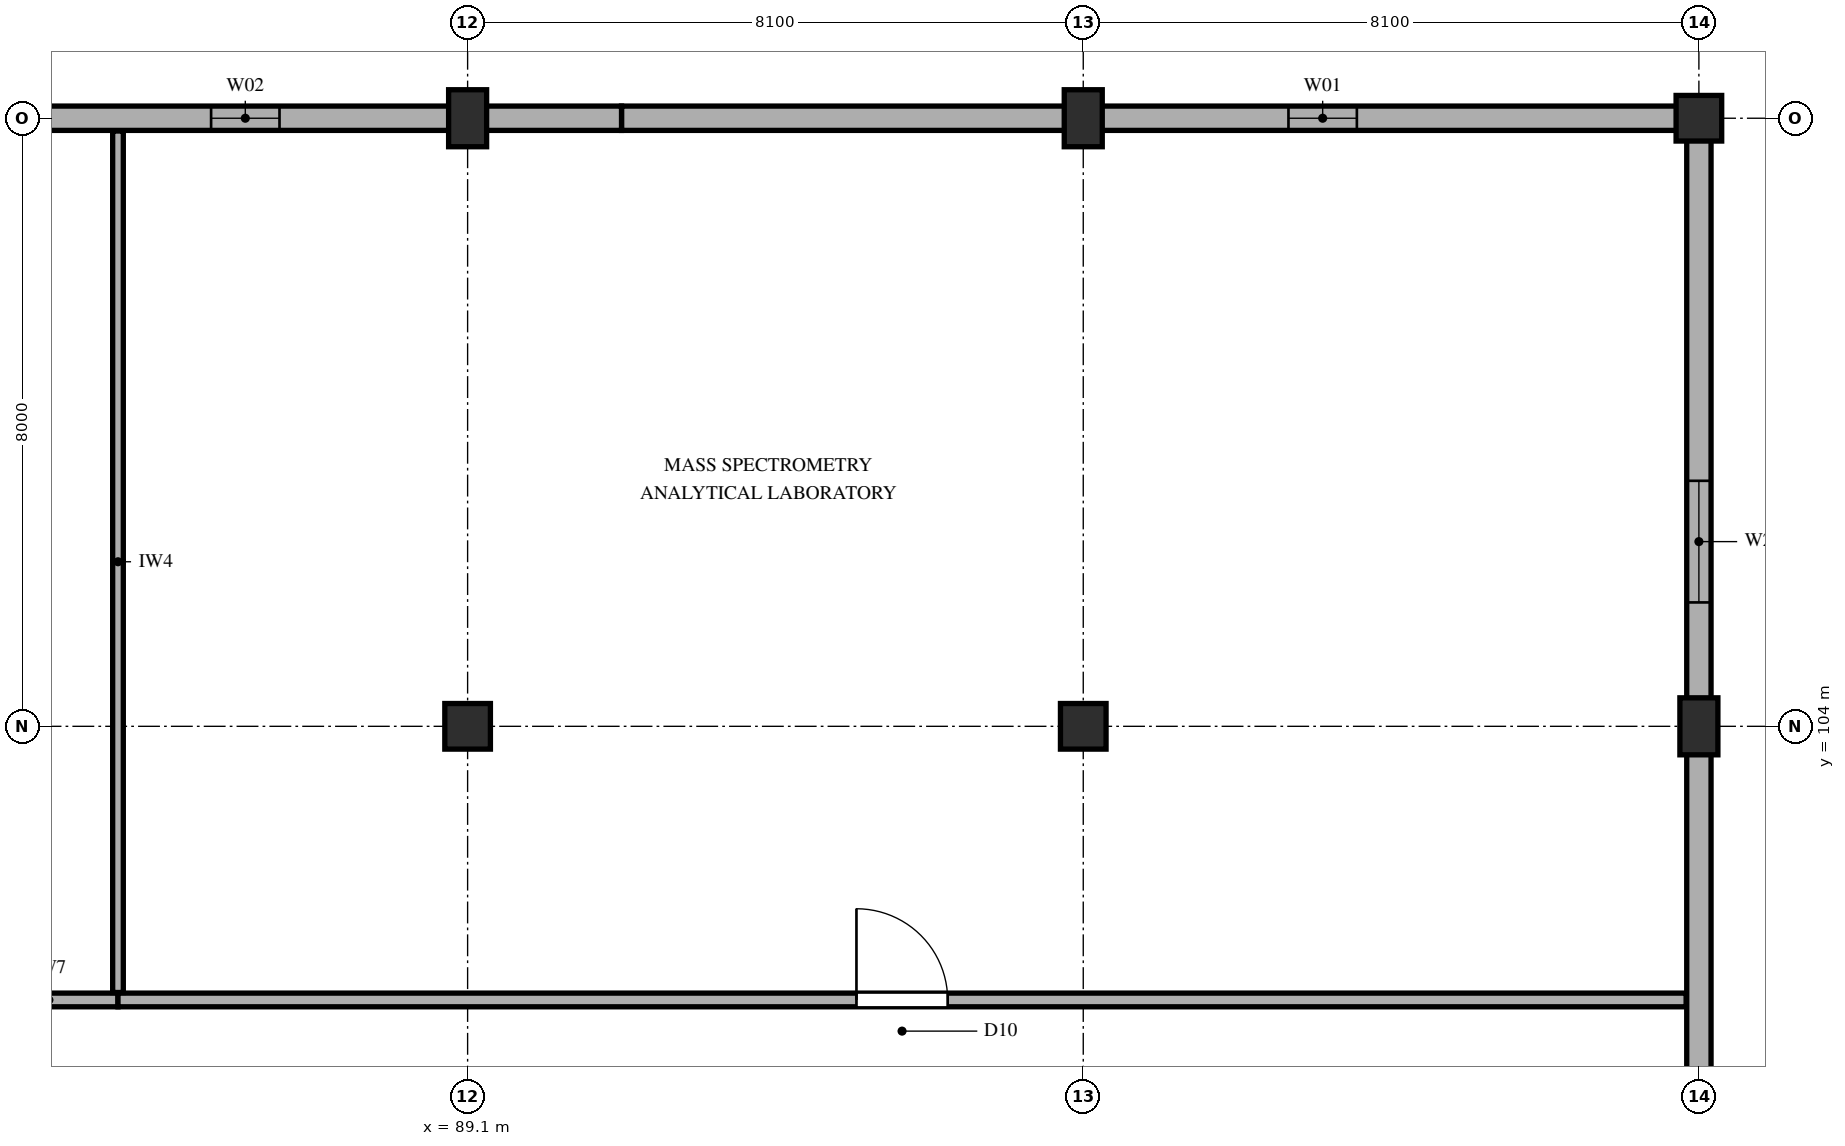
"""IFC4 building model, lengths in metres.
Left out: names, types, materials, properties, quantities, classifications, styles, units other than length and angle.
Written with IfcOpenShell. Run it as: python <this file> out.ifc"""

import sys

from ifc_helpers import new_model, si_unit, direction, frame, frame_2d, origin, origin_2d, place, context, subcontext, project, spatial, rectangle, extrude, element, fill, save


model = new_model("IFC4")
c1 = context("Model", 3, precision=1e-05, world=origin(), true_north=direction((0.0, 1.0)))
c2 = subcontext(c1, "Body", "Model", "MODEL_VIEW")
j1 = project(units=[si_unit("LENGTHUNIT", "METRE"), si_unit("PLANEANGLEUNIT", "RADIAN")], contexts=[c1])
p1 = place(None, origin())
s1 = spatial("IfcSite", under=j1, at=p1, CompositionType="ELEMENT")
p2 = place(p1, origin())
s2 = spatial("IfcBuilding", under=s1, at=p2, CompositionType="ELEMENT")
p3 = place(p2, frame((0.0, 0.0, 10.2)))
s3 = spatial("IfcBuildingStorey", under=s2, at=p3, CompositionType="ELEMENT", Elevation=10.2)
p4 = place(p3, frame((89.1, 104.0, 0.0), z_axis=(0.0, 0.0, 1.0), x_axis=(1.0, 0.0, 0.0)))
e1 = element("IfcColumn", 1, at=p4, inside=s3, PredefinedType="COLUMN", context=c2, shape_type="SweptSolid", body=[
    extrude(rectangle(XDim=0.6, YDim=0.6, at=origin_2d()), origin(), (0.0, 0.0, 1.0), 4.5),
])
p5 = place(p3, frame((89.1, 112.0, 0.0), z_axis=(0.0, 0.0, 1.0), x_axis=(1.0, 0.0, 0.0)))
e2 = element("IfcColumn", 2, at=p5, inside=s3, PredefinedType="COLUMN", context=c2, shape_type="SweptSolid", body=[
    extrude(rectangle(XDim=0.5, YDim=0.75, at=origin_2d()), origin(), (0.0, 0.0, 1.0), 4.5),
])
p6 = place(p3, frame((97.2, 104.0, 0.0), z_axis=(0.0, 0.0, 1.0), x_axis=(1.0, 0.0, 0.0)))
e3 = element("IfcColumn", 3, at=p6, inside=s3, PredefinedType="COLUMN", context=c2, shape_type="SweptSolid", body=[
    extrude(rectangle(XDim=0.6, YDim=0.6, at=origin_2d()), origin(), (0.0, 0.0, 1.0), 4.5),
])
for number, where, z_axis, x_axis in (
    (4, (97.2, 112.0, 0.0), (0.0, 0.0, 1.0), (1.0, 0.0, 0.0)),
    (5, (105.3, 104.0, 0.0), (0.0, 0.0, 1.0), (1.0, 0.0, 0.0)),
):
    element("IfcColumn", number, at=place(p3, frame(where, z_axis=z_axis, x_axis=x_axis)), inside=s3, PredefinedType="COLUMN", context=c2, shape_type="SweptSolid", body=[
        extrude(rectangle(XDim=0.5, YDim=0.75, at=origin_2d()), origin(), (0.0, 0.0, 1.0), 4.5),
    ])
p7 = place(p3, frame((105.3, 112.0, 0.0), z_axis=(0.0, 0.0, 1.0), x_axis=(1.0, 0.0, 0.0)))
e6 = element("IfcColumn", 6, at=p7, inside=s3, PredefinedType="COLUMN", context=c2, shape_type="SweptSolid", body=[
    extrude(rectangle(XDim=0.6, YDim=0.6, at=origin_2d()), origin(), (0.0, 0.0, 1.0), 4.5),
])
p8 = place(p3, frame((105.3, 96.18, 0.0), z_axis=(0.0, 0.0, 1.0), x_axis=(0.0, 1.0, 0.0)))
e7 = element("IfcWall", 7, at=p8, inside=s3, PredefinedType="SOLIDWALL", context=c2, shape_type="SweptSolid", body=[
    extrude(rectangle(XDim=15.82, YDim=0.32, at=frame_2d((7.91, 0.0))), origin(), (0.0, 0.0, 1.0), 3.732),
])
p9 = place(p8, frame((9.45, 0.0, 0.95)))
e8 = element("IfcOpeningElement", 8, at=p9, cuts=e7, PredefinedType="OPENING", context=c2, shape_type="SweptSolid", body=[
    extrude(rectangle(XDim=1.6, YDim=1.4, at=frame_2d((0.8, 0.7))), frame((0.0, 0.17, 0.0), z_axis=(0.0, -1.0, 0.0), x_axis=(1.0, 0.0, 0.0)), (0.0, 0.0, 1.0), 0.34),
])
p10 = place(p3, frame((105.3, 112.0, 0.0), z_axis=(0.0, 0.0, 1.0), x_axis=(-1.0, 0.0, 0.0)))
e9 = element("IfcWall", 9, at=p10, inside=s3, PredefinedType="SOLIDWALL", context=c2, shape_type="SweptSolid", body=[
    extrude(rectangle(XDim=14.175, YDim=0.32, at=frame_2d((7.087, 0.0))), origin(), (0.0, 0.0, 1.0), 3.632),
])
p11 = place(p10, frame((4.5, 0.0, 0.95)))
e10 = element("IfcOpeningElement", 10, at=p11, cuts=e9, PredefinedType="OPENING", context=c2, shape_type="SweptSolid", body=[
    extrude(rectangle(XDim=0.9, YDim=1.8, at=frame_2d((0.45, 0.9))), frame((0.0, 0.17, 0.0), z_axis=(0.0, -1.0, 0.0), x_axis=(1.0, 0.0, 0.0)), (0.0, 0.0, 1.0), 0.34),
])
p12 = place(p3, frame((91.125, 112.0, 0.0), z_axis=(0.0, 0.0, 1.0), x_axis=(-1.0, 0.0, 0.0)))
e11 = element("IfcWall", 11, at=p12, inside=s3, PredefinedType="SOLIDWALL", context=c2, shape_type="SweptSolid", body=[
    extrude(rectangle(XDim=14.175, YDim=0.32, at=frame_2d((7.087, 0.0))), origin(), (0.0, 0.0, 1.0), 3.632),
])
p13 = place(p12, frame((4.5, 0.0, 0.85)))
e12 = element("IfcOpeningElement", 12, at=p13, cuts=e11, PredefinedType="OPENING", context=c2, shape_type="SweptSolid", body=[
    extrude(rectangle(XDim=0.9, YDim=2.1, at=frame_2d((0.45, 1.05))), frame((0.0, 0.17, 0.0), z_axis=(0.0, -1.0, 0.0), x_axis=(1.0, 0.0, 0.0)), (0.0, 0.0, 1.0), 0.34),
])
p14 = place(p3, frame((65.4, 100.4, 0.0), z_axis=(0.0, 0.0, 1.0), x_axis=(1.0, 0.0, 0.0)))
e13 = element("IfcWall", 13, at=p14, inside=s3, PredefinedType="PARTITIONING", context=c2, shape_type="SweptSolid", body=[
    extrude(rectangle(XDim=19.1, YDim=0.18, at=frame_2d((9.55, 0.0))), origin(), (0.0, 0.0, 1.0), 4.24),
])
p15 = place(p14, frame((8.95, 0.0, 0.0)))
e14 = element("IfcOpeningElement", 14, at=p15, cuts=e13, PredefinedType="OPENING", context=c2, shape_type="SweptSolid", body=[
    extrude(rectangle(XDim=1.2, YDim=2.3, at=frame_2d((0.6, 1.15))), frame((0.0, 0.1, 0.0), z_axis=(0.0, -1.0, 0.0), x_axis=(1.0, 0.0, 0.0)), (0.0, 0.0, 1.0), 0.2),
])
p16 = place(p3, frame((84.5, 100.4, 0.0), z_axis=(0.0, 0.0, 1.0), x_axis=(1.0, 0.0, 0.0)))
e15 = element("IfcWall", 15, at=p16, inside=s3, PredefinedType="PARTITIONING", context=c2, shape_type="SweptSolid", body=[
    extrude(rectangle(XDim=20.632, YDim=0.18, at=frame_2d((10.316, 0.0))), origin(), (0.0, 0.0, 1.0), 4.24),
])
p17 = place(p16, frame((9.716, 0.0, 0.0)))
e16 = element("IfcOpeningElement", 16, at=p17, cuts=e15, PredefinedType="OPENING", context=c2, shape_type="SweptSolid", body=[
    extrude(rectangle(XDim=1.2, YDim=2.3, at=frame_2d((0.6, 1.15))), frame((0.0, 0.1, 0.0), z_axis=(0.0, -1.0, 0.0), x_axis=(1.0, 0.0, 0.0)), (0.0, 0.0, 1.0), 0.2),
])
for number, where, z_axis, x_axis in (
    (17, (84.5, 100.498, 0.0), (0.0, 0.0, 1.0), (0.0, 1.0, 0.0)),
    (18, (84.5, 106.165, 0.0), (0.0, 0.0, 1.0), (0.0, 1.0, 0.0)),
):
    element("IfcWall", number, at=place(p3, frame(where, z_axis=z_axis, x_axis=x_axis)), inside=s3, PredefinedType="PARTITIONING", context=c2, shape_type="SweptSolid", body=[
        extrude(rectangle(XDim=5.667, YDim=0.14, at=frame_2d((2.833, 0.0))), origin(), (0.0, 0.0, 1.0), 4.24),
    ])
p18 = place(p9, origin())
e19 = element("IfcWindow", 19, at=p18, inside=s3, PartitioningType="SINGLE_PANEL", PredefinedType="WINDOW", context=c2, shape_type="SweptSolid", body=[
    extrude(rectangle(XDim=1.6, YDim=1.4, at=frame_2d((0.8, 0.7))), frame((0.0, 0.03, 0.0), z_axis=(0.0, -1.0, 0.0), x_axis=(1.0, 0.0, 0.0)), (0.0, 0.0, 1.0), 0.06),
])
fill(e8, e19)
p19 = place(p11, origin())
e20 = element("IfcWindow", 20, at=p19, inside=s3, PartitioningType="SINGLE_PANEL", PredefinedType="WINDOW", context=c2, shape_type="SweptSolid", body=[
    extrude(rectangle(XDim=0.9, YDim=1.8, at=frame_2d((0.45, 0.9))), frame((0.0, 0.03, 0.0), z_axis=(0.0, -1.0, 0.0), x_axis=(1.0, 0.0, 0.0)), (0.0, 0.0, 1.0), 0.06),
])
fill(e10, e20)
p20 = place(p13, origin())
e21 = element("IfcWindow", 21, at=p20, inside=s3, PartitioningType="SINGLE_PANEL", PredefinedType="WINDOW", context=c2, shape_type="SweptSolid", body=[
    extrude(rectangle(XDim=0.9, YDim=2.1, at=frame_2d((0.45, 1.05))), frame((0.0, 0.03, 0.0), z_axis=(0.0, -1.0, 0.0), x_axis=(1.0, 0.0, 0.0)), (0.0, 0.0, 1.0), 0.06),
])
fill(e12, e21)
p21 = place(p17, origin())
e22 = element("IfcDoor", 22, at=p21, inside=s3, OperationType="SINGLE_SWING_LEFT", PredefinedType="DOOR", context=c2, shape_type="SweptSolid", body=[
    extrude(rectangle(XDim=1.2, YDim=2.3, at=frame_2d((0.6, 1.15))), frame((0.0, 0.025, 0.0), z_axis=(0.0, -1.0, 0.0), x_axis=(1.0, 0.0, 0.0)), (0.0, 0.0, 1.0), 0.05),
])
fill(e16, e22)
save(model, sys.argv[1])
